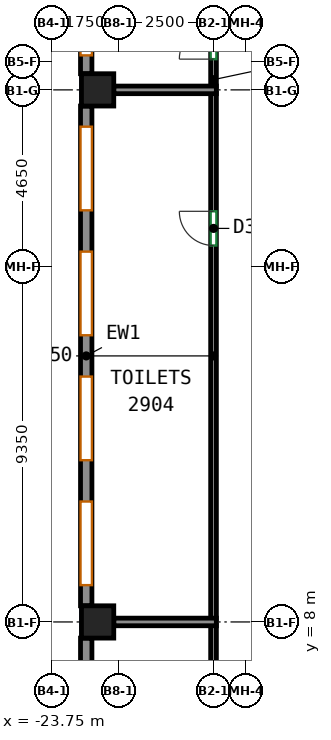
"""IFC4 building model, lengths in metres.
Left out: names, types, materials, properties, quantities, classifications, styles, units other than length and angle.
Written with IfcOpenShell. Run it as: python <this file> out.ifc"""

import sys

from ifc_helpers import new_model, si_unit, direction, frame, frame_2d, origin, origin_2d, place, context, subcontext, project, spatial, rectangle, extrude, source, transform, mapped, element, fill, save


model = new_model("IFC4")
c1 = context("Model", 3, precision=1e-05, world=origin(), true_north=direction((0.0, 1.0)))
c2 = subcontext(c1, "Body", "Model", "MODEL_VIEW")
j1 = project(units=[si_unit("LENGTHUNIT", "METRE"), si_unit("PLANEANGLEUNIT", "RADIAN")], contexts=[c1])
p1 = place(None, origin())
s1 = spatial("IfcSite", under=j1, at=p1, CompositionType="ELEMENT")
p2 = place(p1, origin())
s2 = spatial("IfcBuilding", under=s1, at=p2, CompositionType="ELEMENT")
p3 = place(p2, frame((0.0, 0.0, 124.6)))
s3 = spatial("IfcBuildingStorey", under=s2, at=p3, CompositionType="ELEMENT", Elevation=124.6)
m1 = source(origin(), c2, "Body", "SweptSolid", [
    extrude(rectangle(XDim=0.85, YDim=0.85, at=origin_2d()), origin(), (0.0, 0.0, 1.0), 3.6),
])
for number, where, z_axis, x_axis in (
    (1, (-22.55, 8.0, 0.0), (0.0, 0.0, 1.0), (1.0, 0.0, 0.0)),
    (2, (-22.55, 22.0, 0.0), (0.0, 0.0, 1.0), (1.0, 0.0, 0.0)),
):
    element("IfcColumn", number, at=place(p3, frame(where, z_axis=z_axis, x_axis=x_axis)), inside=s3, PredefinedType="COLUMN", context=c2, shape_type="MappedRepresentation", body=[
        mapped(m1, transform((0.0, 0.0, 0.0))),
    ])
m2 = source(origin(), c2, "Body", "SweptSolid", [
    extrude(rectangle(XDim=6.332, YDim=0.3, at=frame_2d((3.166, 0.0))), origin(), (0.0, 0.0, 1.0), 3.6),
])
p4 = place(p3, frame((-22.85, 28.757, 0.0), z_axis=(0.0, 0.0, 1.0), x_axis=(0.0, -1.0, 0.0)))
e3 = element("IfcWall", 3, at=p4, inside=s3, PredefinedType="SOLIDWALL", context=c2, shape_type="MappedRepresentation", body=[
    mapped(m2, transform((0.0, 0.0, 0.0))),
])
p5 = place(p4, frame((0.483, 0.0, 0.7)))
e4 = element("IfcOpeningElement", 4, at=p5, cuts=e3, PredefinedType="OPENING", context=c2, shape_type="SweptSolid", body=[
    extrude(rectangle(XDim=2.2, YDim=2.25, at=frame_2d((1.1, 1.125))), frame((0.0, 0.16, 0.0), z_axis=(0.0, -1.0, 0.0), x_axis=(1.0, 0.0, 0.0)), (0.0, 0.0, 1.0), 0.32),
])
p6 = place(p4, frame((3.649, 0.0, 0.7)))
e5 = element("IfcOpeningElement", 5, at=p6, cuts=e3, PredefinedType="OPENING", context=c2, shape_type="SweptSolid", body=[
    extrude(rectangle(XDim=2.2, YDim=2.25, at=frame_2d((1.1, 1.125))), frame((0.0, 0.16, 0.0), z_axis=(0.0, -1.0, 0.0), x_axis=(1.0, 0.0, 0.0)), (0.0, 0.0, 1.0), 0.32),
])
m3 = source(origin(), c2, "Body", "SweptSolid", [
    extrude(rectangle(XDim=13.15, YDim=0.3, at=frame_2d((6.575, 0.0))), origin(), (0.0, 0.0, 1.0), 3.6),
])
p7 = place(p3, frame((-22.85, 21.575, 0.0), z_axis=(0.0, 0.0, 1.0), x_axis=(0.0, -1.0, 0.0)))
e6 = element("IfcWall", 6, at=p7, inside=s3, PredefinedType="SOLIDWALL", context=c2, shape_type="MappedRepresentation", body=[
    mapped(m3, transform((0.0, 0.0, 0.0))),
])
p8 = place(p7, frame((0.544, 0.0, 0.7)))
e7 = element("IfcOpeningElement", 7, at=p8, cuts=e6, PredefinedType="OPENING", context=c2, shape_type="SweptSolid", body=[
    extrude(rectangle(XDim=2.2, YDim=2.25, at=frame_2d((1.1, 1.125))), frame((0.0, 0.16, 0.0), z_axis=(0.0, -1.0, 0.0), x_axis=(1.0, 0.0, 0.0)), (0.0, 0.0, 1.0), 0.32),
])
p9 = place(p7, frame((3.831, 0.0, 0.7)))
e8 = element("IfcOpeningElement", 8, at=p9, cuts=e6, PredefinedType="OPENING", context=c2, shape_type="SweptSolid", body=[
    extrude(rectangle(XDim=2.2, YDim=2.25, at=frame_2d((1.1, 1.125))), frame((0.0, 0.16, 0.0), z_axis=(0.0, -1.0, 0.0), x_axis=(1.0, 0.0, 0.0)), (0.0, 0.0, 1.0), 0.32),
])
p10 = place(p7, frame((7.119, 0.0, 0.7)))
e9 = element("IfcOpeningElement", 9, at=p10, cuts=e6, PredefinedType="OPENING", context=c2, shape_type="SweptSolid", body=[
    extrude(rectangle(XDim=2.2, YDim=2.25, at=frame_2d((1.1, 1.125))), frame((0.0, 0.16, 0.0), z_axis=(0.0, -1.0, 0.0), x_axis=(1.0, 0.0, 0.0)), (0.0, 0.0, 1.0), 0.32),
])
p11 = place(p7, frame((10.406, 0.0, 0.7)))
e10 = element("IfcOpeningElement", 10, at=p11, cuts=e6, PredefinedType="OPENING", context=c2, shape_type="SweptSolid", body=[
    extrude(rectangle(XDim=2.2, YDim=2.25, at=frame_2d((1.1, 1.125))), frame((0.0, 0.16, 0.0), z_axis=(0.0, -1.0, 0.0), x_axis=(1.0, 0.0, 0.0)), (0.0, 0.0, 1.0), 0.32),
])
m4 = source(origin(), c2, "Body", "SweptSolid", [
    extrude(rectangle(XDim=6.9, YDim=0.3, at=frame_2d((3.45, 0.0))), origin(), (0.0, 0.0, 1.0), 3.6),
])
p12 = place(p3, frame((-22.85, 7.575, 0.0), z_axis=(0.0, 0.0, 1.0), x_axis=(0.0, -1.0, 0.0)))
e11 = element("IfcWall", 11, at=p12, inside=s3, PredefinedType="SOLIDWALL", context=c2, shape_type="MappedRepresentation", body=[
    mapped(m4, transform((0.0, 0.0, 0.0))),
])
p13 = place(p12, frame((0.625, 0.0, 0.7)))
e12 = element("IfcOpeningElement", 12, at=p13, cuts=e11, PredefinedType="OPENING", context=c2, shape_type="SweptSolid", body=[
    extrude(rectangle(XDim=2.2, YDim=2.25, at=frame_2d((1.1, 1.125))), frame((0.0, 0.16, 0.0), z_axis=(0.0, -1.0, 0.0), x_axis=(1.0, 0.0, 0.0)), (0.0, 0.0, 1.0), 0.32),
])
p14 = place(p12, frame((4.075, 0.0, 0.7)))
e13 = element("IfcOpeningElement", 13, at=p14, cuts=e11, PredefinedType="OPENING", context=c2, shape_type="SweptSolid", body=[
    extrude(rectangle(XDim=2.2, YDim=2.25, at=frame_2d((1.1, 1.125))), frame((0.0, 0.16, 0.0), z_axis=(0.0, -1.0, 0.0), x_axis=(1.0, 0.0, 0.0)), (0.0, 0.0, 1.0), 0.32),
])
p15 = place(p3, frame((-19.5, 4.2, 0.0), z_axis=(0.0, 0.0, 1.0), x_axis=(0.0, 1.0, 0.0)))
e14 = element("IfcWall", 14, at=p15, inside=s3, PredefinedType="PARTITIONING", context=c2, shape_type="SweptSolid", body=[
    extrude(rectangle(XDim=3.71, YDim=0.15, at=frame_2d((1.855, 0.0))), origin(), (0.0, 0.0, 1.0), 2.95),
])
p16 = place(p3, frame((-19.5, 22.09, 0.0), z_axis=(0.0, 0.0, 1.0), x_axis=(0.0, 1.0, 0.0)))
e15 = element("IfcWall", 15, at=p16, inside=s3, PredefinedType="PARTITIONING", context=c2, shape_type="SweptSolid", body=[
    extrude(rectangle(XDim=2.235, YDim=0.15, at=frame_2d((1.117, 0.0))), origin(), (0.0, 0.0, 1.0), 2.95),
])
p17 = place(p16, frame((0.719, 0.0, 0.0)))
e16 = element("IfcOpeningElement", 16, at=p17, cuts=e15, PredefinedType="OPENING", context=c2, shape_type="SweptSolid", body=[
    extrude(rectangle(XDim=0.9, YDim=2.1, at=frame_2d((0.45, 1.05))), frame((0.0, 0.085, 0.0), z_axis=(0.0, -1.0, 0.0), x_axis=(1.0, 0.0, 0.0)), (0.0, 0.0, 1.0), 0.17),
])
p18 = place(p3, frame((-19.5, 8.09, 0.0), z_axis=(0.0, 0.0, 1.0), x_axis=(0.0, 1.0, 0.0)))
e17 = element("IfcWall", 17, at=p18, inside=s3, PredefinedType="PARTITIONING", context=c2, shape_type="SweptSolid", body=[
    extrude(rectangle(XDim=13.82, YDim=0.15, at=frame_2d((6.91, 0.0))), origin(), (0.0, 0.0, 1.0), 2.95),
])
p19 = place(p18, frame((9.815, 0.0, 0.0)))
e18 = element("IfcOpeningElement", 18, at=p19, cuts=e17, PredefinedType="OPENING", context=c2, shape_type="SweptSolid", body=[
    extrude(rectangle(XDim=0.9, YDim=2.1, at=frame_2d((0.45, 1.05))), frame((0.0, 0.085, 0.0), z_axis=(0.0, -1.0, 0.0), x_axis=(1.0, 0.0, 0.0)), (0.0, 0.0, 1.0), 0.17),
])
for number, where, z_axis, x_axis in (
    (19, (-22.125, 8.0, 0.0), (0.0, 0.0, 1.0), (1.0, 0.0, 0.0)),
    (20, (-22.125, 22.0, 0.0), (0.0, 0.0, 1.0), (1.0, 0.0, 0.0)),
):
    element("IfcWall", number, at=place(p3, frame(where, z_axis=z_axis, x_axis=x_axis)), inside=s3, PredefinedType="PARTITIONING", context=c2, shape_type="SweptSolid", body=[
        extrude(rectangle(XDim=2.699, YDim=0.2, at=frame_2d((1.35, 0.0))), origin(), (0.0, 0.0, 1.0), 3.6),
    ])
p20 = place(p6, origin())
e21 = element("IfcWindow", 21, at=p20, inside=s3, PartitioningType="SINGLE_PANEL", PredefinedType="WINDOW", context=c2, shape_type="SweptSolid", body=[
    extrude(rectangle(XDim=2.2, YDim=2.25, at=frame_2d((1.1, 1.125))), frame((0.0, 0.03, 0.0), z_axis=(0.0, -1.0, 0.0), x_axis=(1.0, 0.0, 0.0)), (0.0, 0.0, 1.0), 0.06),
])
fill(e5, e21)
p21 = place(p8, origin())
e22 = element("IfcWindow", 22, at=p21, inside=s3, PartitioningType="SINGLE_PANEL", PredefinedType="WINDOW", context=c2, shape_type="SweptSolid", body=[
    extrude(rectangle(XDim=2.2, YDim=2.25, at=frame_2d((1.1, 1.125))), frame((0.0, 0.03, 0.0), z_axis=(0.0, -1.0, 0.0), x_axis=(1.0, 0.0, 0.0)), (0.0, 0.0, 1.0), 0.06),
])
fill(e7, e22)
p22 = place(p9, origin())
e23 = element("IfcWindow", 23, at=p22, inside=s3, PartitioningType="SINGLE_PANEL", PredefinedType="WINDOW", context=c2, shape_type="SweptSolid", body=[
    extrude(rectangle(XDim=2.2, YDim=2.25, at=frame_2d((1.1, 1.125))), frame((0.0, 0.03, 0.0), z_axis=(0.0, -1.0, 0.0), x_axis=(1.0, 0.0, 0.0)), (0.0, 0.0, 1.0), 0.06),
])
fill(e8, e23)
p23 = place(p10, origin())
e24 = element("IfcWindow", 24, at=p23, inside=s3, PartitioningType="SINGLE_PANEL", PredefinedType="WINDOW", context=c2, shape_type="SweptSolid", body=[
    extrude(rectangle(XDim=2.2, YDim=2.25, at=frame_2d((1.1, 1.125))), frame((0.0, 0.03, 0.0), z_axis=(0.0, -1.0, 0.0), x_axis=(1.0, 0.0, 0.0)), (0.0, 0.0, 1.0), 0.06),
])
fill(e9, e24)
p24 = place(p11, origin())
e25 = element("IfcWindow", 25, at=p24, inside=s3, PartitioningType="SINGLE_PANEL", PredefinedType="WINDOW", context=c2, shape_type="SweptSolid", body=[
    extrude(rectangle(XDim=2.2, YDim=2.25, at=frame_2d((1.1, 1.125))), frame((0.0, 0.03, 0.0), z_axis=(0.0, -1.0, 0.0), x_axis=(1.0, 0.0, 0.0)), (0.0, 0.0, 1.0), 0.06),
])
fill(e10, e25)
p25 = place(p19, origin())
e26 = element("IfcDoor", 26, at=p25, inside=s3, OperationType="SINGLE_SWING_RIGHT", PredefinedType="DOOR", context=c2, shape_type="SweptSolid", body=[
    extrude(rectangle(XDim=0.9, YDim=2.1, at=frame_2d((0.45, 1.05))), frame((0.0, 0.025, 0.0), z_axis=(0.0, -1.0, 0.0), x_axis=(1.0, 0.0, 0.0)), (0.0, 0.0, 1.0), 0.05),
])
fill(e18, e26)
p26 = place(p17, origin())
e27 = element("IfcDoor", 27, at=p26, inside=s3, OperationType="SINGLE_SWING_LEFT", PredefinedType="DOOR", context=c2, shape_type="SweptSolid", body=[
    extrude(rectangle(XDim=0.9, YDim=2.1, at=frame_2d((0.45, 1.05))), frame((0.0, 0.025, 0.0), z_axis=(0.0, -1.0, 0.0), x_axis=(1.0, 0.0, 0.0)), (0.0, 0.0, 1.0), 0.05),
])
fill(e16, e27)
save(model, sys.argv[1])
